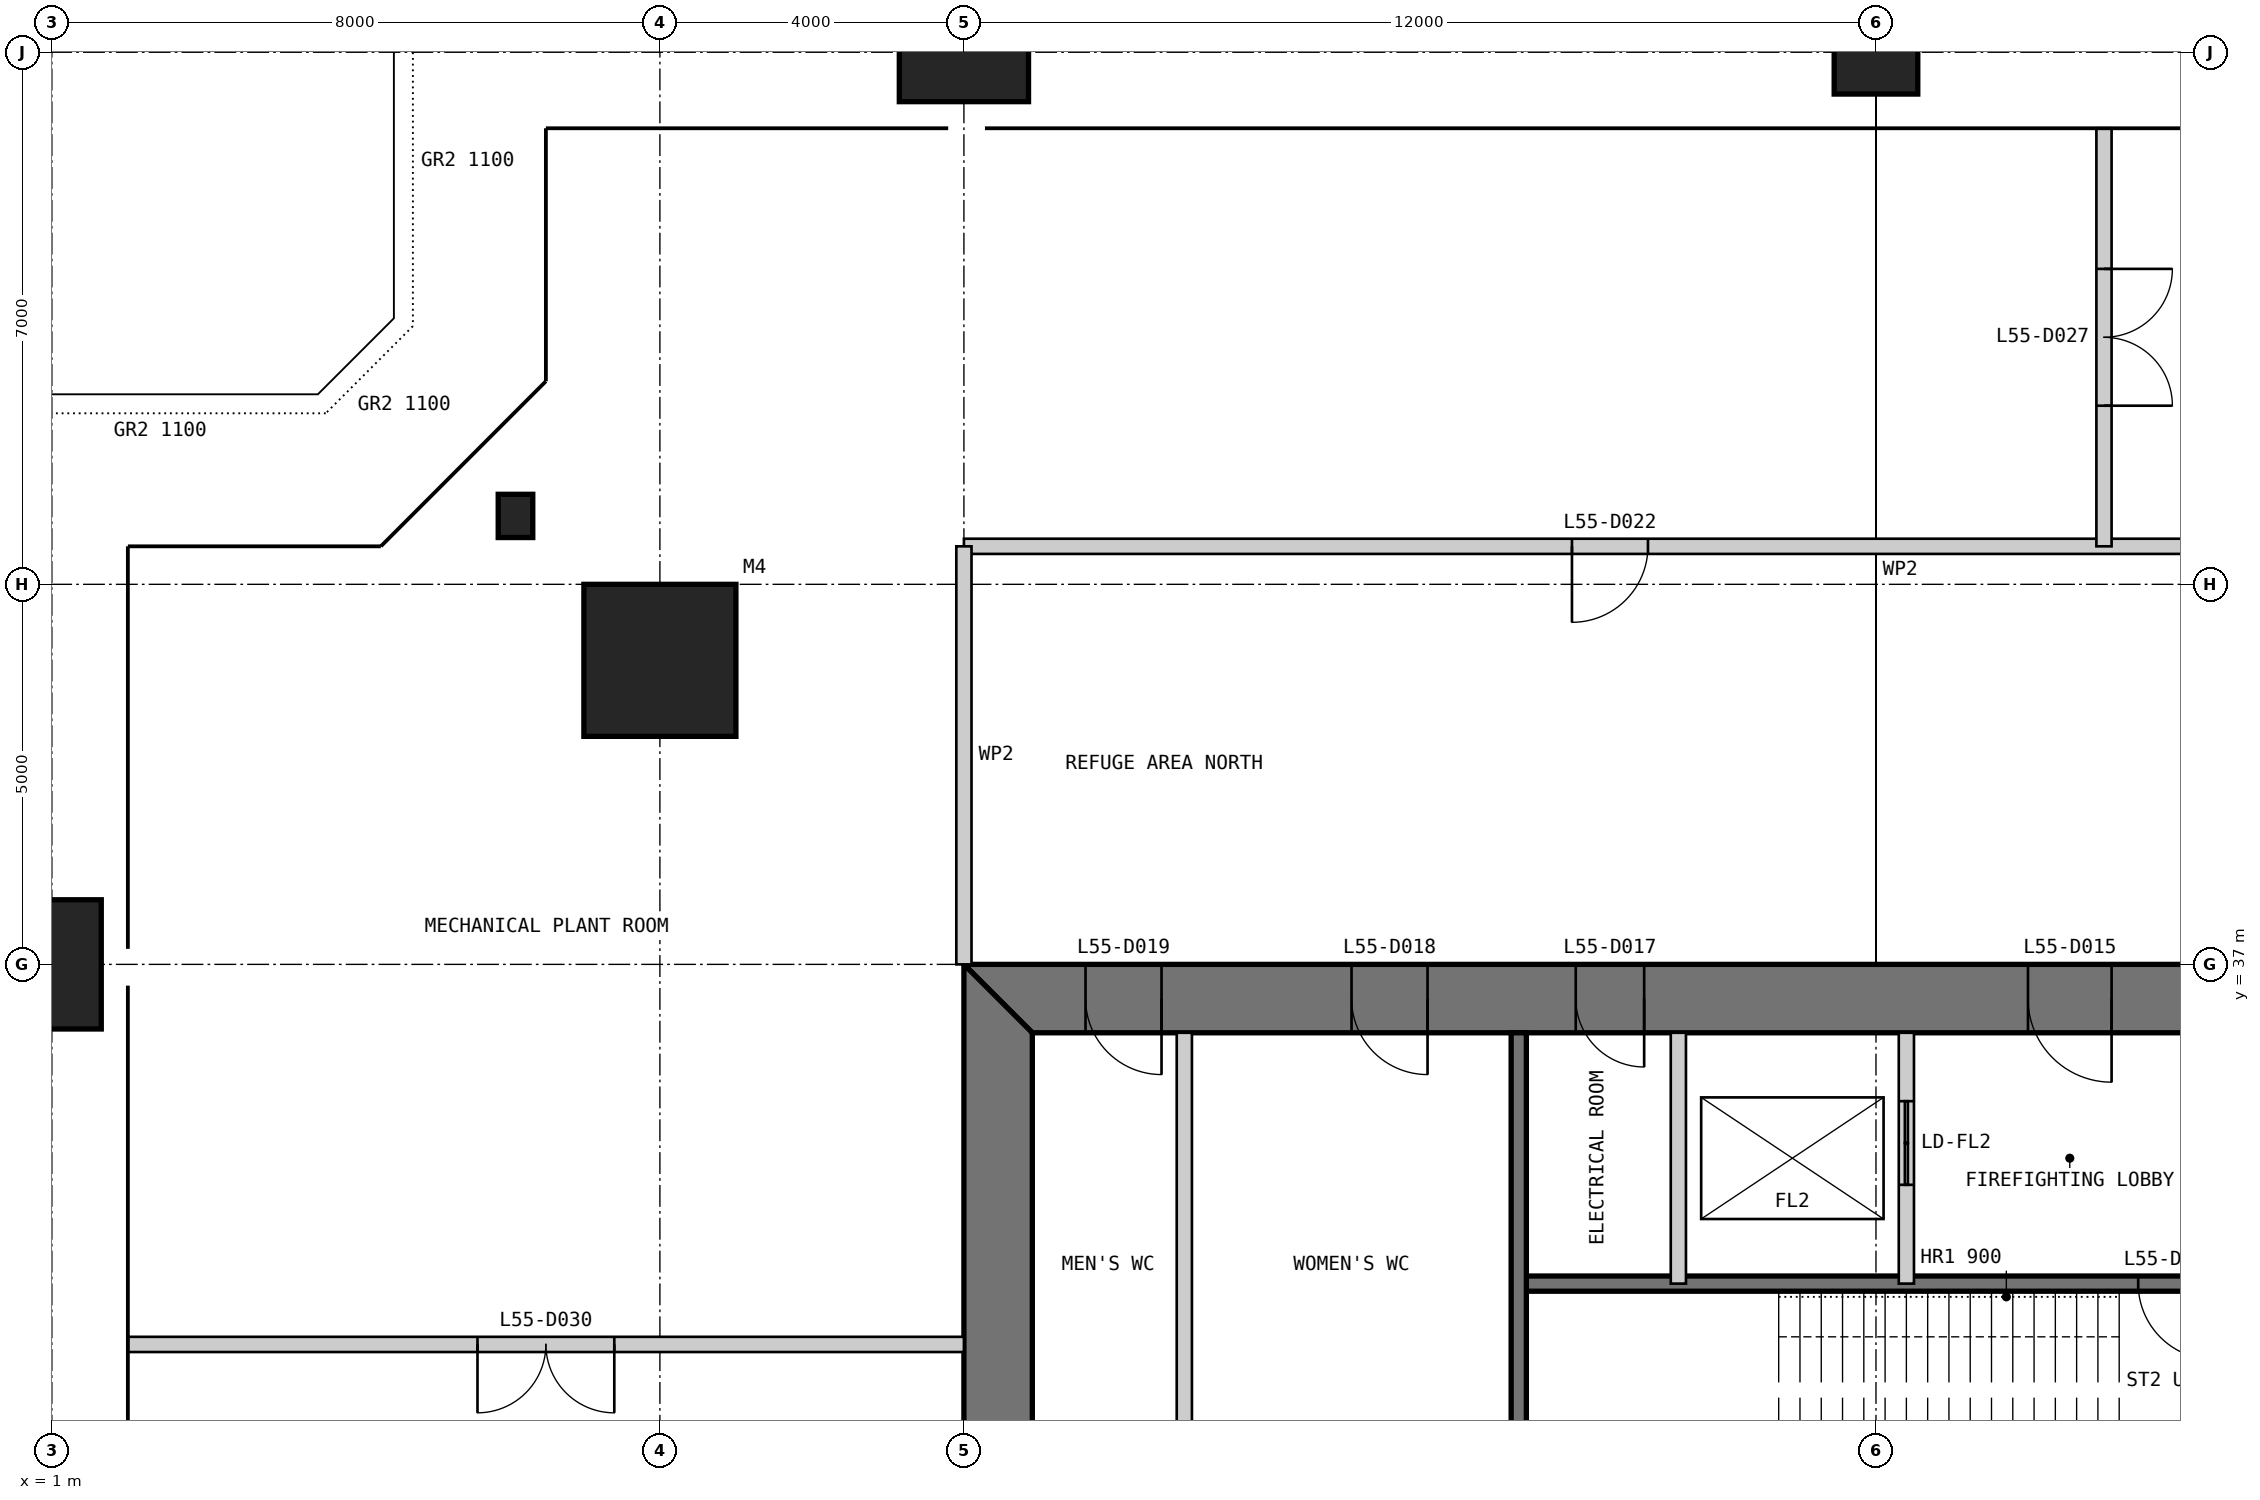
"""IFC4 building model, lengths in metres.
Left out: names, types, materials, properties, quantities, classifications, styles, units other than length and angle.
Written with IfcOpenShell. Run it as: python <this file> out.ifc"""

import sys

from ifc_helpers import new_model, si_unit, direction, frame, frame_2d, origin, origin_2d, place, context, subcontext, project, spatial, polyline, rectangle, i_section, outline, extrude, element, fill, save


model = new_model("IFC4")
c1 = context("Model", 3, precision=1e-05, world=origin(), true_north=direction((0.0, 1.0)))
c2 = subcontext(c1, "Body", "Model", "MODEL_VIEW")
j1 = project(units=[si_unit("LENGTHUNIT", "METRE"), si_unit("PLANEANGLEUNIT", "RADIAN")], contexts=[c1])
p1 = place(None, origin())
s1 = spatial("IfcSite", under=j1, at=p1, CompositionType="ELEMENT")
p2 = place(p1, origin())
s2 = spatial("IfcBuilding", under=s1, at=p2, CompositionType="ELEMENT")
p3 = place(p2, frame((0.0, 0.0, 233.8)))
s3 = spatial("IfcBuildingStorey", under=s2, at=p3, CompositionType="ELEMENT", Elevation=233.8)
p4 = place(p3, frame((9.0, 41.0, 0.0), z_axis=(0.0, 0.0, 1.0), x_axis=(1.0, 0.0, 0.0)))
e1 = element("IfcColumn", 1, at=p4, inside=s3, PredefinedType="COLUMN", context=c2, shape_type="SweptSolid", body=[
    extrude(rectangle(XDim=2.0, YDim=2.0, at=origin_2d()), origin(), (0.0, 0.0, 1.0), 6.0),
])
p5 = place(p3, frame((25.0, 49.0, 0.0), z_axis=(0.0, 0.0, 1.0), x_axis=(1.0, 0.0, 0.0)))
e2 = element("IfcColumn", 2, at=p5, inside=s3, PredefinedType="COLUMN", context=c2, shape_type="SweptSolid", body=[
    extrude(rectangle(XDim=1.1, YDim=1.1, at=origin_2d()), origin(), (0.0, 0.0, 1.0), 6.0),
])
p6 = place(p3, frame((13.0, 49.0, 0.0), z_axis=(0.0, 0.0, 1.0), x_axis=(1.0, 0.0, 0.0)))
e3 = element("IfcColumn", 3, at=p6, inside=s3, PredefinedType="COLUMN", context=c2, shape_type="SweptSolid", body=[
    extrude(rectangle(XDim=1.7, YDim=1.3, at=origin_2d()), origin(), (0.0, 0.0, 1.0), 6.0),
])
p7 = place(p3, frame((1.0, 37.0, 0.0), z_axis=(0.0, 0.0, 1.0), x_axis=(1.0, 0.0, 0.0)))
e4 = element("IfcColumn", 4, at=p7, inside=s3, PredefinedType="COLUMN", context=c2, shape_type="SweptSolid", body=[
    extrude(rectangle(XDim=1.3, YDim=1.7, at=origin_2d()), origin(), (0.0, 0.0, 1.0), 6.0),
])
p8 = place(p3, frame((7.1, 42.9, 0.0), z_axis=(0.0, 0.0, 1.0), x_axis=(1.0, 0.0, 0.0)))
e5 = element("IfcColumn", 5, at=p8, inside=s3, PredefinedType="COLUMN", context=c2, shape_type="SweptSolid", body=[
    extrude(i_section(OverallWidth=0.455, OverallDepth=0.569, WebThickness=0.078, FlangeThickness=0.125, at=origin_2d()), origin(), (0.0, 0.0, 1.0), 4.6),
])
p9 = place(p3, frame((37.0, 36.55, 0.0), z_axis=(0.0, 0.0, 1.0), x_axis=(-1.0, 0.0, 0.0)))
e6 = element("IfcWall", 6, at=p9, inside=s3, PredefinedType="SHEAR", context=c2, shape_type="SweptSolid", body=[
    extrude(outline(polyline([(0.0, -0.45), (24.0, -0.45), (23.1, 0.45), (0.9, 0.45), (0.0, -0.45)])), origin(), (0.0, 0.0, 1.0), 6.0),
])
p10 = place(p9, frame((4.9, 0.0, 0.0)))
e7 = element("IfcOpeningElement", 7, at=p10, cuts=e6, PredefinedType="OPENING", context=c2, shape_type="SweptSolid", body=[
    extrude(rectangle(XDim=1.0, YDim=2.2, at=frame_2d((0.5, 1.1))), frame((0.0, 0.46, 0.0), z_axis=(0.0, -1.0, 0.0), x_axis=(1.0, 0.0, 0.0)), (0.0, 0.0, 1.0), 0.92),
])
p11 = place(p9, frame((8.9, 0.0, 0.0)))
e8 = element("IfcOpeningElement", 8, at=p11, cuts=e6, PredefinedType="OPENING", context=c2, shape_type="SweptSolid", body=[
    extrude(rectangle(XDim=1.1, YDim=2.2, at=frame_2d((0.55, 1.1))), frame((0.0, 0.46, 0.0), z_axis=(0.0, -1.0, 0.0), x_axis=(1.0, 0.0, 0.0)), (0.0, 0.0, 1.0), 0.92),
])
p12 = place(p9, frame((15.05, 0.0, 0.0)))
e9 = element("IfcOpeningElement", 9, at=p12, cuts=e6, PredefinedType="OPENING", context=c2, shape_type="SweptSolid", body=[
    extrude(rectangle(XDim=0.9, YDim=2.2, at=frame_2d((0.45, 1.1))), frame((0.0, 0.46, 0.0), z_axis=(0.0, -1.0, 0.0), x_axis=(1.0, 0.0, 0.0)), (0.0, 0.0, 1.0), 0.92),
])
p13 = place(p9, frame((17.9, 0.0, 0.0)))
e10 = element("IfcOpeningElement", 10, at=p13, cuts=e6, PredefinedType="OPENING", context=c2, shape_type="SweptSolid", body=[
    extrude(rectangle(XDim=1.0, YDim=2.2, at=frame_2d((0.5, 1.1))), frame((0.0, 0.46, 0.0), z_axis=(0.0, -1.0, 0.0), x_axis=(1.0, 0.0, 0.0)), (0.0, 0.0, 1.0), 0.92),
])
p14 = place(p9, frame((21.4, 0.0, 0.0)))
e11 = element("IfcOpeningElement", 11, at=p14, cuts=e6, PredefinedType="OPENING", context=c2, shape_type="SweptSolid", body=[
    extrude(rectangle(XDim=1.0, YDim=2.2, at=frame_2d((0.5, 1.1))), frame((0.0, 0.46, 0.0), z_axis=(0.0, -1.0, 0.0), x_axis=(1.0, 0.0, 0.0)), (0.0, 0.0, 1.0), 0.92),
])
p15 = place(p3, frame((13.45, 36.1, 0.0), z_axis=(0.0, 0.0, 1.0), x_axis=(0.0, -1.0, 0.0)))
e12 = element("IfcWall", 12, at=p15, inside=s3, PredefinedType="SHEAR", context=c2, shape_type="SweptSolid", body=[
    extrude(outline(polyline([(-0.9, -0.45), (23.1, -0.45), (22.2, 0.45), (0.0, 0.45), (-0.9, -0.45)])), origin(), (0.0, 0.0, 1.0), 6.0),
])
p16 = place(p15, frame((20.2, 0.0, 0.0)))
e13 = element("IfcOpeningElement", 13, at=p16, cuts=e12, PredefinedType="OPENING", context=c2, shape_type="SweptSolid", body=[
    extrude(rectangle(XDim=1.0, YDim=2.2, at=frame_2d((0.5, 1.1))), frame((0.0, 0.46, 0.0), z_axis=(0.0, -1.0, 0.0), x_axis=(1.0, 0.0, 0.0)), (0.0, 0.0, 1.0), 0.92),
])
p17 = place(p15, frame((17.25, 0.0, 0.0)))
e14 = element("IfcOpeningElement", 14, at=p17, cuts=e12, PredefinedType="OPENING", context=c2, shape_type="SweptSolid", body=[
    extrude(rectangle(XDim=0.9, YDim=2.2, at=frame_2d((0.45, 1.1))), frame((0.0, 0.46, 0.0), z_axis=(0.0, -1.0, 0.0), x_axis=(1.0, 0.0, 0.0)), (0.0, 0.0, 1.0), 0.92),
])
p18 = place(p3, frame((29.7, 32.8, 0.0), z_axis=(0.0, 0.0, 1.0), x_axis=(-1.0, 0.0, 0.0)))
e15 = element("IfcWall", 15, at=p18, inside=s3, PredefinedType="SOLIDWALL", context=c2, shape_type="SweptSolid", body=[
    extrude(rectangle(XDim=9.4, YDim=0.2, at=frame_2d((4.7, 0.0))), origin(), (0.0, 0.0, 1.0), 5.8),
])
p19 = place(p18, frame((0.25, 0.0, 0.0)))
e16 = element("IfcOpeningElement", 16, at=p19, cuts=e15, PredefinedType="OPENING", context=c2, shape_type="SweptSolid", body=[
    extrude(rectangle(XDim=1.0, YDim=2.2, at=frame_2d((0.5, 1.1))), frame((0.0, 0.11, 0.0), z_axis=(0.0, -1.0, 0.0), x_axis=(1.0, 0.0, 0.0)), (0.0, 0.0, 1.0), 0.22),
])
p20 = place(p3, frame((25.4, 36.1, 0.0), z_axis=(0.0, 0.0, 1.0), x_axis=(0.0, -1.0, 0.0)))
e17 = element("IfcWall", 17, at=p20, inside=s3, PredefinedType="PARTITIONING", context=c2, shape_type="SweptSolid", body=[
    extrude(rectangle(XDim=3.3, YDim=0.2, at=frame_2d((1.65, 0.0))), origin(), (0.0, 0.0, 1.0), 5.8),
])
p21 = place(p20, frame((0.9, 0.0, 0.0)))
e18 = element("IfcOpeningElement", 18, at=p21, cuts=e17, PredefinedType="OPENING", context=c2, shape_type="SweptSolid", body=[
    extrude(rectangle(XDim=1.1, YDim=2.2, at=frame_2d((0.55, 1.1))), frame((0.0, 0.11, 0.0), z_axis=(0.0, -1.0, 0.0), x_axis=(1.0, 0.0, 0.0)), (0.0, 0.0, 1.0), 0.22),
])
p22 = place(p3, frame((22.4, 36.1, 0.0), z_axis=(0.0, 0.0, 1.0), x_axis=(0.0, -1.0, 0.0)))
e19 = element("IfcWall", 19, at=p22, inside=s3, PredefinedType="PARTITIONING", context=c2, shape_type="SweptSolid", body=[
    extrude(rectangle(XDim=3.3, YDim=0.2, at=frame_2d((1.65, 0.0))), origin(), (0.0, 0.0, 1.0), 5.8),
])
p23 = place(p3, frame((20.3, 36.1, 0.0), z_axis=(0.0, 0.0, 1.0), x_axis=(0.0, -1.0, 0.0)))
e20 = element("IfcWall", 20, at=p23, inside=s3, PredefinedType="SOLIDWALL", context=c2, shape_type="SweptSolid", body=[
    extrude(rectangle(XDim=6.1, YDim=0.2, at=frame_2d((3.05, 0.0))), origin(), (0.0, 0.0, 1.0), 5.8),
])
p24 = place(p3, frame((15.9, 36.1, 0.0), z_axis=(0.0, 0.0, 1.0), x_axis=(0.0, -1.0, 0.0)))
e21 = element("IfcWall", 21, at=p24, inside=s3, PredefinedType="PARTITIONING", context=c2, shape_type="SweptSolid", body=[
    extrude(rectangle(XDim=6.1, YDim=0.2, at=frame_2d((3.05, 0.0))), origin(), (0.0, 0.0, 1.0), 5.8),
])
p25 = place(p3, frame((13.0, 42.5, 0.0), z_axis=(0.0, 0.0, 1.0), x_axis=(1.0, 0.0, 0.0)))
e22 = element("IfcWall", 22, at=p25, inside=s3, PredefinedType="PARTITIONING", context=c2, shape_type="SweptSolid", body=[
    extrude(rectangle(XDim=24.0, YDim=0.2, at=frame_2d((12.0, 0.0))), origin(), (0.0, 0.0, 1.0), 5.8),
])
p26 = place(p25, frame((8.0, 0.0, 0.0)))
e23 = element("IfcOpeningElement", 23, at=p26, cuts=e22, PredefinedType="OPENING", context=c2, shape_type="SweptSolid", body=[
    extrude(rectangle(XDim=1.0, YDim=2.2, at=frame_2d((0.5, 1.1))), frame((0.0, 0.11, 0.0), z_axis=(0.0, -1.0, 0.0), x_axis=(1.0, 0.0, 0.0)), (0.0, 0.0, 1.0), 0.22),
])
p27 = place(p3, frame((13.0, 37.0, 0.0), z_axis=(0.0, 0.0, 1.0), x_axis=(0.0, 1.0, 0.0)))
e24 = element("IfcWall", 24, at=p27, inside=s3, PredefinedType="PARTITIONING", context=c2, shape_type="SweptSolid", body=[
    extrude(rectangle(XDim=5.5, YDim=0.2, at=frame_2d((2.75, 0.0))), origin(), (0.0, 0.0, 1.0), 4.705),
])
p28 = place(p3, frame((28.0, 42.5, 0.0), z_axis=(0.0, 0.0, 1.0), x_axis=(0.0, 1.0, 0.0)))
e25 = element("IfcWall", 25, at=p28, inside=s3, PredefinedType="PARTITIONING", context=c2, shape_type="SweptSolid", body=[
    extrude(rectangle(XDim=5.5, YDim=0.2, at=frame_2d((2.75, 0.0))), origin(), (0.0, 0.0, 1.0), 4.954),
])
p29 = place(p28, frame((1.85, 0.0, 0.0)))
e26 = element("IfcOpeningElement", 26, at=p29, cuts=e25, PredefinedType="OPENING", context=c2, shape_type="SweptSolid", body=[
    extrude(rectangle(XDim=1.8, YDim=2.4, at=frame_2d((0.9, 1.2))), frame((0.0, 0.11, 0.0), z_axis=(0.0, -1.0, 0.0), x_axis=(1.0, 0.0, 0.0)), (0.0, 0.0, 1.0), 0.22),
])
p30 = place(p3, frame((2.0, 32.0, 0.0), z_axis=(0.0, 0.0, 1.0), x_axis=(1.0, 0.0, 0.0)))
e27 = element("IfcWall", 27, at=p30, inside=s3, PredefinedType="PARTITIONING", context=c2, shape_type="SweptSolid", body=[
    extrude(rectangle(XDim=11.0, YDim=0.2, at=frame_2d((5.5, 0.0))), origin(), (0.0, 0.0, 1.0), 5.8),
])
p31 = place(p30, frame((4.6, 0.0, 0.0)))
e28 = element("IfcOpeningElement", 28, at=p31, cuts=e27, PredefinedType="OPENING", context=c2, shape_type="SweptSolid", body=[
    extrude(rectangle(XDim=1.8, YDim=2.4, at=frame_2d((0.9, 1.2))), frame((0.0, 0.11, 0.0), z_axis=(0.0, -1.0, 0.0), x_axis=(1.0, 0.0, 0.0)), (0.0, 0.0, 1.0), 0.22),
])
p32 = place(p11, origin())
e29 = element("IfcDoor", 29, at=p32, inside=s3, OperationType="SINGLE_SWING_LEFT", PredefinedType="DOOR", context=c2, shape_type="SweptSolid", body=[
    extrude(rectangle(XDim=1.1, YDim=2.2, at=frame_2d((0.55, 1.1))), frame((0.0, 0.025, 0.0), z_axis=(0.0, -1.0, 0.0), x_axis=(1.0, 0.0, 0.0)), (0.0, 0.0, 1.0), 0.05),
    extrude(outline(polyline([(0.0, 0.0), (0.04, 0.0), (0.04, 2.16), (1.06, 2.16), (1.06, 0.0), (1.1, 0.0), (1.1, 2.2), (0.0, 2.2), (0.0, 0.0)])), frame((0.0, 0.3, 0.0), z_axis=(0.0, -1.0, 0.0), x_axis=(1.0, 0.0, 0.0)), (0.0, 0.0, 1.0), 0.6),
])
fill(e8, e29)
p33 = place(p19, origin())
e30 = element("IfcDoor", 30, at=p33, inside=s3, OperationType="SINGLE_SWING_LEFT", PredefinedType="DOOR", context=c2, shape_type="SweptSolid", body=[
    extrude(rectangle(XDim=1.0, YDim=2.2, at=frame_2d((0.5, 1.1))), frame((0.0, 0.025, 0.0), z_axis=(0.0, -1.0, 0.0), x_axis=(1.0, 0.0, 0.0)), (0.0, 0.0, 1.0), 0.05),
])
fill(e16, e30)
p34 = place(p12, origin())
e31 = element("IfcDoor", 31, at=p34, inside=s3, OperationType="SINGLE_SWING_LEFT", PredefinedType="DOOR", context=c2, shape_type="SweptSolid", body=[
    extrude(rectangle(XDim=0.9, YDim=2.2, at=frame_2d((0.45, 1.1))), frame((0.0, 0.025, 0.0), z_axis=(0.0, -1.0, 0.0), x_axis=(1.0, 0.0, 0.0)), (0.0, 0.0, 1.0), 0.05),
    extrude(outline(polyline([(0.0, 0.0), (0.04, 0.0), (0.04, 2.16), (0.86, 2.16), (0.86, 0.0), (0.9, 0.0), (0.9, 2.2), (0.0, 2.2), (0.0, 0.0)])), frame((0.0, 0.3, 0.0), z_axis=(0.0, -1.0, 0.0), x_axis=(1.0, 0.0, 0.0)), (0.0, 0.0, 1.0), 0.6),
])
fill(e9, e31)
p35 = place(p13, origin())
e32 = element("IfcDoor", 32, at=p35, inside=s3, OperationType="SINGLE_SWING_LEFT", PredefinedType="DOOR", context=c2, shape_type="SweptSolid", body=[
    extrude(rectangle(XDim=1.0, YDim=2.2, at=frame_2d((0.5, 1.1))), frame((0.0, 0.025, 0.0), z_axis=(0.0, -1.0, 0.0), x_axis=(1.0, 0.0, 0.0)), (0.0, 0.0, 1.0), 0.05),
    extrude(outline(polyline([(0.0, 0.0), (0.04, 0.0), (0.04, 2.16), (0.96, 2.16), (0.96, 0.0), (1.0, 0.0), (1.0, 2.2), (0.0, 2.2), (0.0, 0.0)])), frame((0.0, 0.3, 0.0), z_axis=(0.0, -1.0, 0.0), x_axis=(1.0, 0.0, 0.0)), (0.0, 0.0, 1.0), 0.6),
])
fill(e10, e32)
p36 = place(p14, origin())
e33 = element("IfcDoor", 33, at=p36, inside=s3, OperationType="SINGLE_SWING_LEFT", PredefinedType="DOOR", context=c2, shape_type="SweptSolid", body=[
    extrude(rectangle(XDim=1.0, YDim=2.2, at=frame_2d((0.5, 1.1))), frame((0.0, 0.025, 0.0), z_axis=(0.0, -1.0, 0.0), x_axis=(1.0, 0.0, 0.0)), (0.0, 0.0, 1.0), 0.05),
    extrude(outline(polyline([(0.0, 0.0), (0.04, 0.0), (0.04, 2.16), (0.96, 2.16), (0.96, 0.0), (1.0, 0.0), (1.0, 2.2), (0.0, 2.2), (0.0, 0.0)])), frame((0.0, 0.3, 0.0), z_axis=(0.0, -1.0, 0.0), x_axis=(1.0, 0.0, 0.0)), (0.0, 0.0, 1.0), 0.6),
])
fill(e11, e33)
p37 = place(p26, frame((1.0, 0.0, 0.0), z_axis=(0.0, 0.0, 1.0), x_axis=(-1.0, 0.0, 0.0)))
e34 = element("IfcDoor", 34, at=p37, inside=s3, OperationType="SINGLE_SWING_RIGHT", PredefinedType="DOOR", context=c2, shape_type="SweptSolid", body=[
    extrude(rectangle(XDim=1.0, YDim=2.2, at=frame_2d((0.5, 1.1))), frame((0.0, 0.025, 0.0), z_axis=(0.0, -1.0, 0.0), x_axis=(1.0, 0.0, 0.0)), (0.0, 0.0, 1.0), 0.05),
])
fill(e23, e34)
p38 = place(p29, frame((1.8, 0.0, 0.0), z_axis=(0.0, 0.0, 1.0), x_axis=(-1.0, 0.0, 0.0)))
e35 = element("IfcDoor", 35, at=p38, inside=s3, OperationType="DOUBLE_DOOR_SINGLE_SWING", PredefinedType="DOOR", context=c2, shape_type="SweptSolid", body=[
    extrude(rectangle(XDim=1.8, YDim=2.4, at=frame_2d((0.9, 1.2))), frame((0.0, 0.025, 0.0), z_axis=(0.0, -1.0, 0.0), x_axis=(1.0, 0.0, 0.0)), (0.0, 0.0, 1.0), 0.05),
])
fill(e26, e35)
p39 = place(p31, frame((1.8, 0.0, 0.0), z_axis=(0.0, 0.0, 1.0), x_axis=(-1.0, 0.0, 0.0)))
e36 = element("IfcDoor", 36, at=p39, inside=s3, OperationType="DOUBLE_DOOR_SINGLE_SWING", PredefinedType="DOOR", context=c2, shape_type="SweptSolid", body=[
    extrude(rectangle(XDim=1.8, YDim=2.4, at=frame_2d((0.9, 1.2))), frame((0.0, 0.025, 0.0), z_axis=(0.0, -1.0, 0.0), x_axis=(1.0, 0.0, 0.0)), (0.0, 0.0, 1.0), 0.05),
])
fill(e28, e36)
p40 = place(p21, origin())
e37 = element("IfcDoor", 37, at=p40, inside=s3, OperationType="DOUBLE_DOOR_SLIDING", PredefinedType="DOOR", context=c2, shape_type="SweptSolid", body=[
    extrude(rectangle(XDim=1.1, YDim=2.2, at=frame_2d((0.55, 1.1))), frame((0.0, 0.025, 0.0), z_axis=(0.0, -1.0, 0.0), x_axis=(1.0, 0.0, 0.0)), (0.0, 0.0, 1.0), 0.05),
])
fill(e18, e37)
save(model, sys.argv[1])
